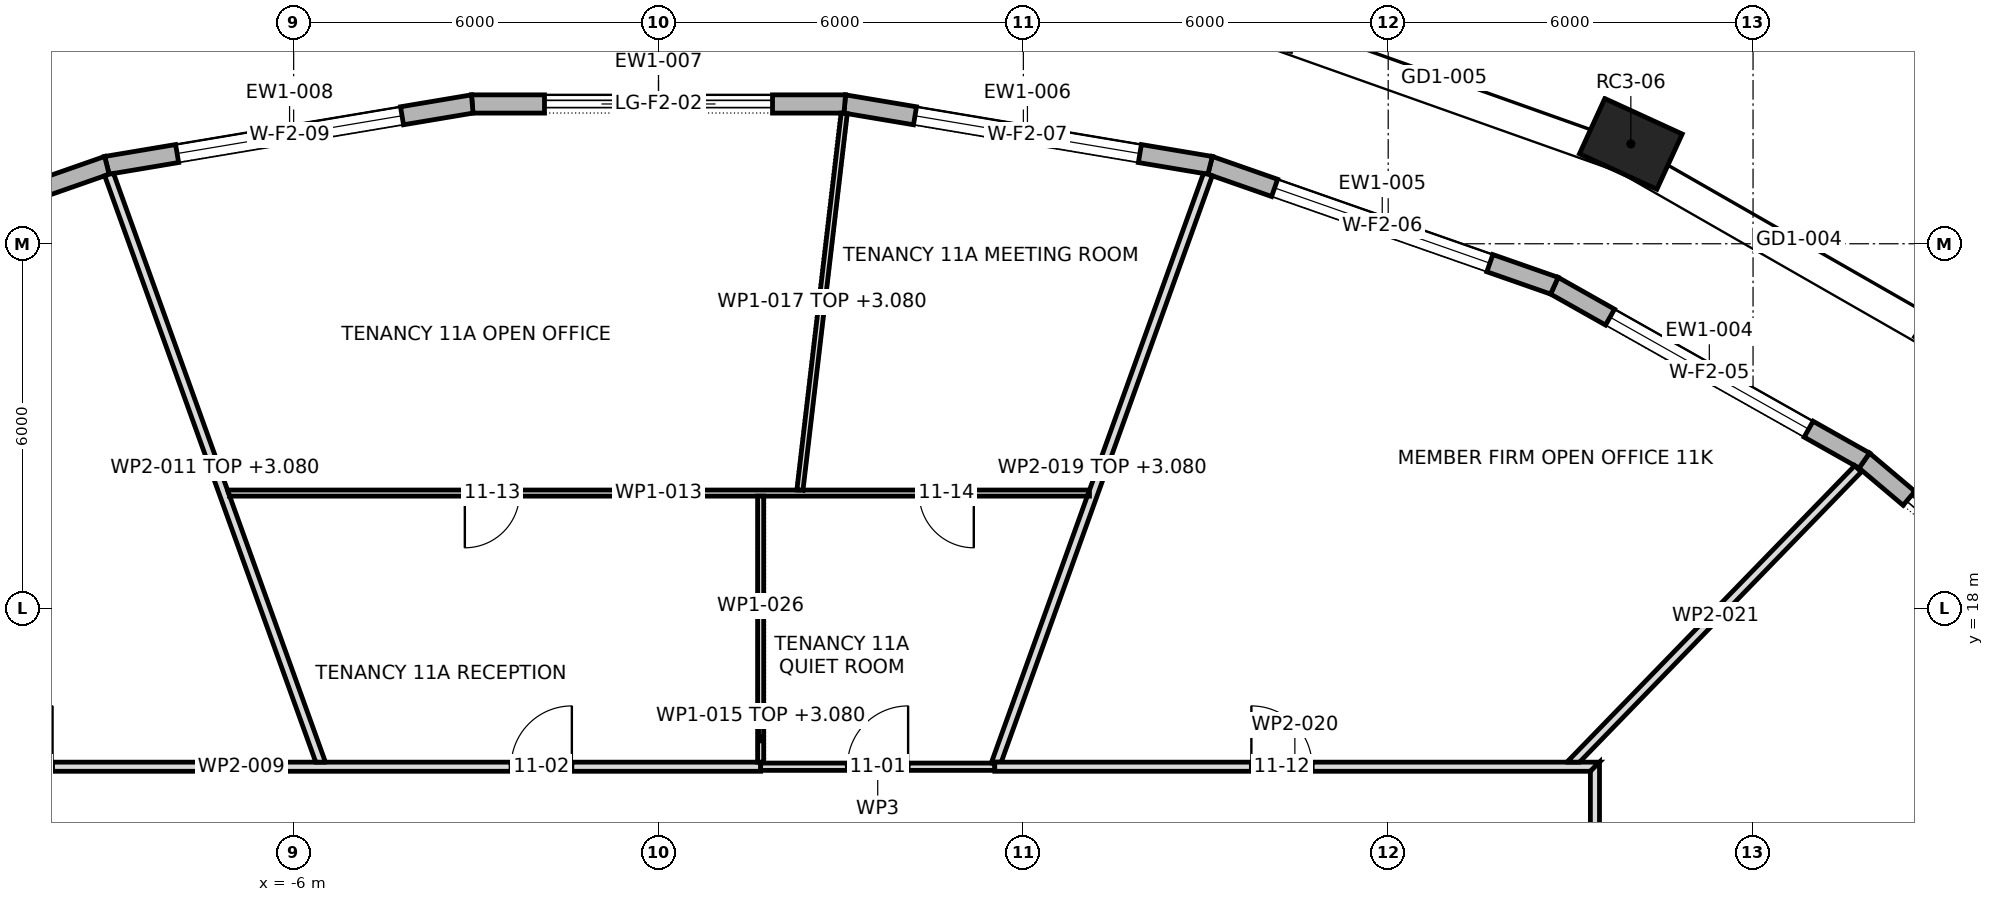
"""IFC4 building model, lengths in metres.
Left out: names, types, materials, properties, quantities, classifications, styles, units other than length and angle.
Written with IfcOpenShell. Run it as: python <this file> out.ifc"""

import sys

from ifc_helpers import new_model, si_unit, direction, frame, frame_2d, origin, origin_2d, place, context, subcontext, project, spatial, polyline, rectangle, outline, extrude, element, fill, save


model = new_model("IFC4")
c1 = context("Model", 3, precision=1e-05, world=origin(), true_north=direction((0.0, 1.0)))
c2 = subcontext(c1, "Body", "Model", "MODEL_VIEW")
j1 = project(units=[si_unit("LENGTHUNIT", "METRE"), si_unit("PLANEANGLEUNIT", "RADIAN")], contexts=[c1])
p1 = place(None, origin())
s1 = spatial("IfcSite", under=j1, at=p1, CompositionType="ELEMENT")
p2 = place(p1, origin())
s2 = spatial("IfcBuilding", under=s1, at=p2, CompositionType="ELEMENT")
p3 = place(p2, frame((0.0, 0.0, 163.3)))
s3 = spatial("IfcBuildingStorey", under=s2, at=p3, CompositionType="ELEMENT", Elevation=163.3)
for number, where, z_axis, x_axis in (
    (1, (21.519, 22.475, 0.0), (0.0, 0.0, 1.0), (-0.818, 0.575, 0.0)),
    (2, (15.99, 25.642, 0.0), (0.0, 0.0, 1.0), (-0.909, 0.417, 0.0)),
):
    element("IfcColumn", number, at=place(p3, frame(where, z_axis=z_axis, x_axis=x_axis)), inside=s3, PredefinedType="COLUMN", context=c2, shape_type="SweptSolid", body=[
        extrude(rectangle(XDim=1.4, YDim=1.0, at=origin_2d()), origin(), (0.0, 0.0, 1.0), 4.2),
    ])
p4 = place(p3, frame((24.165, 16.774, 0.0), z_axis=(0.0, 0.0, 1.0), x_axis=(-0.764076096085, 0.645126126732, 0.0)))
e3 = element("IfcWall", 3, at=p4, inside=s3, PredefinedType="STANDARD", context=c2, shape_type="SweptSolid", body=[
    extrude(outline(polyline([(-0.015, -0.15), (5.689, -0.15), (5.661, 0.15), (0.015, 0.15), (-0.015, -0.15)])), origin(), (0.0, 0.0, 1.0), 3.85),
])
p5 = place(p4, frame((0.962, 0.0, 0.0)))
e4 = element("IfcOpeningElement", 4, at=p5, cuts=e3, PredefinedType="OPENING", context=c2, shape_type="SweptSolid", body=[
    extrude(rectangle(XDim=3.75, YDim=3.45, at=frame_2d((1.875, 1.725))), frame((0.0, 0.162, 0.0), z_axis=(0.0, -1.0, 0.0), x_axis=(1.0, 0.0, 0.0)), (0.0, 0.0, 1.0), 0.324),
])
p6 = place(p3, frame((19.829, 20.435, 0.0), z_axis=(0.0, 0.0, 1.0), x_axis=(-0.870982130072, 0.491314694565, 0.0)))
e5 = element("IfcWall", 5, at=p6, inside=s3, PredefinedType="STANDARD", context=c2, shape_type="SweptSolid", body=[
    extrude(outline(polyline([(-0.014, -0.15), (5.865, -0.15), (5.838, 0.15), (0.014, 0.15), (-0.014, -0.15)])), origin(), (0.0, 0.0, 1.0), 3.85),
])
p7 = place(p6, frame((1.051, 0.0, 0.6)))
e6 = element("IfcOpeningElement", 6, at=p7, cuts=e5, PredefinedType="OPENING", context=c2, shape_type="SweptSolid", body=[
    extrude(rectangle(XDim=3.75, YDim=2.85, at=frame_2d((1.875, 1.425))), frame((0.0, 0.162, 0.0), z_axis=(0.0, -1.0, 0.0), x_axis=(1.0, 0.0, 0.0)), (0.0, 0.0, 1.0), 0.324),
])
p8 = place(p3, frame((14.732, 23.31, 0.0), z_axis=(0.0, 0.0, 1.0), x_axis=(-0.943944636678, 0.330103806228, 0.0)))
e7 = element("IfcWall", 7, at=p8, inside=s3, PredefinedType="STANDARD", context=c2, shape_type="SweptSolid", body=[
    extrude(outline(polyline([(-0.013, -0.15), (6.01, -0.15), (5.985, 0.15), (0.013, 0.15), (-0.013, -0.15)])), origin(), (0.0, 0.0, 1.0), 3.85),
])
p9 = place(p8, frame((1.124, 0.0, 0.6)))
e8 = element("IfcOpeningElement", 8, at=p9, cuts=e7, PredefinedType="OPENING", context=c2, shape_type="SweptSolid", body=[
    extrude(rectangle(XDim=3.75, YDim=2.85, at=frame_2d((1.875, 1.425))), frame((0.0, 0.162, 0.0), z_axis=(0.0, -1.0, 0.0), x_axis=(1.0, 0.0, 0.0)), (0.0, 0.0, 1.0), 0.324),
])
p10 = place(p3, frame((9.071, 25.29, 0.0), z_axis=(0.0, 0.0, 1.0), x_axis=(-0.98618955457, 0.165620537547, 0.0)))
e9 = element("IfcWall", 9, at=p10, inside=s3, PredefinedType="STANDARD", context=c2, shape_type="SweptSolid", body=[
    extrude(outline(polyline([(-0.013, -0.15), (6.105, -0.15), (6.08, 0.15), (0.013, 0.15), (-0.013, -0.15)])), origin(), (0.0, 0.0, 1.0), 3.85),
])
p11 = place(p10, frame((1.171, 0.0, 0.6)))
e10 = element("IfcOpeningElement", 10, at=p11, cuts=e9, PredefinedType="OPENING", context=c2, shape_type="SweptSolid", body=[
    extrude(rectangle(XDim=3.75, YDim=2.85, at=frame_2d((1.875, 1.425))), frame((0.0, 0.162, 0.0), z_axis=(0.0, -1.0, 0.0), x_axis=(1.0, 0.0, 0.0)), (0.0, 0.0, 1.0), 0.324),
])
p12 = place(p3, frame((3.063, 26.299, 0.0), z_axis=(0.0, 0.0, 1.0), x_axis=(-1.0, 0.0, 0.0)))
e11 = element("IfcWall", 11, at=p12, inside=s3, PredefinedType="STANDARD", context=c2, shape_type="SweptSolid", body=[
    extrude(outline(polyline([(-0.012, -0.15), (6.138, -0.15), (6.114, 0.15), (0.012, 0.15), (-0.012, -0.15)])), origin(), (0.0, 0.0, 1.0), 3.85),
])
p13 = place(p12, frame((1.188, 0.0, 0.0)))
e12 = element("IfcOpeningElement", 12, at=p13, cuts=e11, PredefinedType="OPENING", context=c2, shape_type="SweptSolid", body=[
    extrude(rectangle(XDim=3.75, YDim=3.45, at=frame_2d((1.875, 1.725))), frame((0.0, 0.162, 0.0), z_axis=(0.0, -1.0, 0.0), x_axis=(1.0, 0.0, 0.0)), (0.0, 0.0, 1.0), 0.324),
])
p14 = place(p3, frame((-3.063, 26.299, 0.0), z_axis=(0.0, 0.0, 1.0), x_axis=(-0.98618955457, -0.165620537547, 0.0)))
e13 = element("IfcWall", 13, at=p14, inside=s3, PredefinedType="STANDARD", context=c2, shape_type="SweptSolid", body=[
    extrude(outline(polyline([(-0.012, -0.15), (6.105, -0.15), (6.08, 0.15), (0.012, 0.15), (-0.012, -0.15)])), origin(), (0.0, 0.0, 1.0), 3.85),
])
p15 = place(p14, frame((1.171, 0.0, 0.6)))
e14 = element("IfcOpeningElement", 14, at=p15, cuts=e13, PredefinedType="OPENING", context=c2, shape_type="SweptSolid", body=[
    extrude(rectangle(XDim=3.75, YDim=2.85, at=frame_2d((1.875, 1.425))), frame((0.0, 0.162, 0.0), z_axis=(0.0, -1.0, 0.0), x_axis=(1.0, 0.0, 0.0)), (0.0, 0.0, 1.0), 0.324),
])
p16 = place(p3, frame((-9.071, 25.29, 0.0), z_axis=(0.0, 0.0, 1.0), x_axis=(-0.943944636678, -0.330103806228, 0.0)))
e15 = element("IfcWall", 15, at=p16, inside=s3, PredefinedType="STANDARD", context=c2, shape_type="SweptSolid", body=[
    extrude(outline(polyline([(-0.013, -0.15), (6.011, -0.15), (5.984, 0.15), (0.013, 0.15), (-0.013, -0.15)])), origin(), (0.0, 0.0, 1.0), 3.85),
])
p17 = place(p16, frame((1.124, 0.0, 0.6)))
e16 = element("IfcOpeningElement", 16, at=p17, cuts=e15, PredefinedType="OPENING", context=c2, shape_type="SweptSolid", body=[
    extrude(rectangle(XDim=3.75, YDim=2.85, at=frame_2d((1.875, 1.425))), frame((0.0, 0.162, 0.0), z_axis=(0.0, -1.0, 0.0), x_axis=(1.0, 0.0, 0.0)), (0.0, 0.0, 1.0), 0.324),
])
p18 = place(p3, frame((-15.475, 15.4, 0.0), z_axis=(0.0, 0.0, 1.0), x_axis=(1.0, 0.0, 0.0)))
e17 = element("IfcWall", 17, at=p18, inside=s3, PredefinedType="PARTITIONING", context=c2, shape_type="SweptSolid", body=[
    extrude(outline(polyline([(17.155, 0.075), (15.249, 0.075), (13.343, 0.075), (11.437, 0.075), (9.531, 0.075), (7.625, 0.075), (5.719, 0.075), (3.812, 0.075), (1.906, 0.075), (0.0, 0.075), (0.15, -0.075), (2.04, -0.075), (3.929, -0.075), (5.818, -0.075), (7.708, -0.075), (9.597, -0.075), (11.487, -0.075), (13.376, -0.075), (15.266, -0.075), (17.155, -0.075), (17.155, 0.075)])), origin(), (0.0, 0.0, 1.0), 3.85),
])
p19 = place(p18, frame((13.05, 0.0, 0.0)))
e18 = element("IfcOpeningElement", 18, at=p19, cuts=e17, PredefinedType="OPENING", context=c2, shape_type="SweptSolid", body=[
    extrude(rectangle(XDim=1.0, YDim=2.1, at=frame_2d((0.5, 1.05))), frame((0.0, 0.087, 0.0), z_axis=(0.0, -1.0, 0.0), x_axis=(1.0, 0.0, 0.0)), (0.0, 0.0, 1.0), 0.174),
])
p20 = place(p18, frame((4.51, 0.0, 0.0)))
e19 = element("IfcOpeningElement", 19, at=p20, cuts=e17, PredefinedType="OPENING", context=c2, shape_type="SweptSolid", body=[
    extrude(rectangle(XDim=1.0, YDim=2.1, at=frame_2d((0.5, 1.05))), frame((0.0, 0.087, 0.0), z_axis=(0.0, -1.0, 0.0), x_axis=(1.0, 0.0, 0.0)), (0.0, 0.0, 1.0), 0.174),
])
p21 = place(p3, frame((-9.037, 25.143, 0.0), z_axis=(0.0, 0.0, 1.0), x_axis=(0.338668278724, -0.940905838533, 0.0)))
e20 = element("IfcWall", 20, at=p21, inside=s3, PredefinedType="PARTITIONING", context=c2, shape_type="SweptSolid", body=[
    extrude(outline(polyline([(0.0, -0.075), (1.708, -0.075), (3.416, -0.075), (5.124, -0.075), (6.832, -0.075), (8.541, -0.075), (10.249, -0.075), (10.3, 0.069), (10.3, 0.069), (10.302, 0.074), (10.302, 0.075), (8.752, 0.075), (7.203, 0.075), (5.653, 0.075), (5.653, 0.074), (5.651, 0.075), (3.772, 0.075), (1.893, 0.075), (0.014, 0.075), (0.0, 0.003), (0.0, -0.054), (0.0, -0.075)])), origin(), (0.0, 0.0, 1.0), 3.08),
])
p22 = place(p3, frame((-7.087, 19.9, 0.0), z_axis=(0.0, 0.0, 1.0), x_axis=(1.0, 0.0, 0.0)))
e21 = element("IfcWall", 21, at=p22, inside=s3, PredefinedType="PARTITIONING", context=c2, shape_type="SweptSolid", body=[
    extrude(outline(polyline([(0.036, -0.05), (1.772, -0.05), (3.508, -0.05), (5.245, -0.05), (6.981, -0.05), (8.717, -0.05), (8.717, -0.05), (8.817, -0.05), (8.817, -0.05), (10.591, -0.05), (12.365, -0.05), (14.139, -0.05), (14.175, 0.049), (14.175, 0.05), (12.604, 0.05), (11.034, 0.05), (9.464, 0.05), (9.464, 0.049), (9.454, 0.05), (7.563, 0.05), (5.672, 0.05), (3.781, 0.05), (1.891, 0.05), (0.0, 0.05), (0.0, 0.049), (0.036, -0.05)])), origin(), (0.0, 0.0, 1.0), 3.85),
])
p23 = place(p22, frame((3.903, 0.0, 0.0)))
e22 = element("IfcOpeningElement", 22, at=p23, cuts=e21, PredefinedType="OPENING", context=c2, shape_type="SweptSolid", body=[
    extrude(rectangle(XDim=0.9, YDim=2.1, at=frame_2d((0.45, 1.05))), frame((0.0, 0.062, 0.0), z_axis=(0.0, -1.0, 0.0), x_axis=(1.0, 0.0, 0.0)), (0.0, 0.0, 1.0), 0.124),
])
p24 = place(p22, frame((11.373, 0.0, 0.0)))
e23 = element("IfcOpeningElement", 23, at=p24, cuts=e21, PredefinedType="OPENING", context=c2, shape_type="SweptSolid", body=[
    extrude(rectangle(XDim=0.9, YDim=2.1, at=frame_2d((0.45, 1.05))), frame((0.0, 0.062, 0.0), z_axis=(0.0, -1.0, 0.0), x_axis=(1.0, 0.0, 0.0)), (0.0, 0.0, 1.0), 0.124),
])
p25 = place(p3, frame((1.68, 15.46, 0.0), z_axis=(0.0, 0.0, 1.0), x_axis=(0.0, 1.0, 0.0)))
e24 = element("IfcWall", 24, at=p25, inside=s3, PredefinedType="PARTITIONING", context=c2, shape_type="SweptSolid", body=[
    extrude(outline(polyline([(0.79, 0.05), (0.015, 0.05), (0.015, 0.0), (0.0, 0.0), (0.0, -0.05), (0.79, -0.05), (0.79, 0.05)])), origin(), (0.0, 0.0, 1.0), 3.08),
])
p26 = place(p3, frame((1.68, 15.4, 0.0), z_axis=(0.0, 0.0, 1.0), x_axis=(1.0, 0.0, 0.0)))
e25 = element("IfcWall", 25, at=p26, inside=s3, PredefinedType="PARTITIONING", context=c2, shape_type="SweptSolid", body=[
    extrude(rectangle(XDim=3.85, YDim=0.12, at=frame_2d((1.925, 0.0))), origin(), (0.0, 0.0, 1.0), 3.85),
])
p27 = place(p26, frame((1.425, 0.0, 0.0)))
e26 = element("IfcOpeningElement", 26, at=p27, cuts=e25, PredefinedType="OPENING", context=c2, shape_type="SweptSolid", body=[
    extrude(rectangle(XDim=1.0, YDim=2.1, at=frame_2d((0.5, 1.05))), frame((0.0, 0.072, 0.0), z_axis=(0.0, -1.0, 0.0), x_axis=(1.0, 0.0, 0.0)), (0.0, 0.0, 1.0), 0.144),
])
p28 = place(p3, frame((2.325, 19.944, 0.0), z_axis=(0.0, 0.0, 1.0), x_axis=(0.116750504681, 0.993161275754, 0.0)))
e27 = element("IfcWall", 27, at=p28, inside=s3, PredefinedType="PARTITIONING", context=c2, shape_type="SweptSolid", body=[
    extrude(outline(polyline([(6.244, -0.05), (6.244, 0.027), (6.241, 0.05), (4.681, 0.05), (3.121, 0.05), (1.56, 0.05), (0.0, 0.05), (0.012, -0.05), (1.57, -0.05), (3.128, -0.05), (4.686, -0.05), (6.244, -0.05)])), origin(), (0.0, 0.0, 1.0), 3.08),
])
p29 = place(p3, frame((5.542, 15.435, 0.0), z_axis=(0.0, 0.0, 1.0), x_axis=(0.338661655399, 0.940908222497, 0.0)))
e28 = element("IfcWall", 28, at=p29, inside=s3, PredefinedType="PARTITIONING", context=c2, shape_type="SweptSolid", body=[
    extrude(outline(polyline([(10.318, -0.075), (10.318, -0.043), (10.318, 0.003), (10.305, 0.075), (8.46, 0.075), (6.615, 0.075), (4.77, 0.075), (4.677, 0.042), (4.666, 0.075), (3.11, 0.075), (1.555, 0.075), (0.0, 0.075), (0.0, 0.074), (0.02, 0.02), (0.034, 0.025), (0.07, -0.075), (1.778, -0.075), (3.486, -0.075), (5.194, -0.075), (6.902, -0.075), (8.61, -0.075), (10.318, -0.075)])), origin(), (0.0, 0.0, 1.0), 3.08),
])
p30 = place(p3, frame((5.53, 15.4, 0.0), z_axis=(0.0, 0.0, 1.0), x_axis=(1.0, 0.0, 0.0)))
e29 = element("IfcWall", 29, at=p30, inside=s3, PredefinedType="PARTITIONING", context=c2, shape_type="SweptSolid", body=[
    extrude(outline(polyline([(0.0, -0.075), (1.959, -0.075), (3.918, -0.075), (5.877, -0.075), (7.836, -0.075), (9.795, -0.075), (9.945, 0.075), (7.956, 0.075), (5.967, 0.075), (3.978, 0.075), (1.989, 0.075), (0.0, 0.075), (0.0, -0.075)])), origin(), (0.0, 0.0, 1.0), 3.85),
])
p31 = place(p30, frame((4.22, 0.0, 0.0)))
e30 = element("IfcOpeningElement", 30, at=p31, cuts=e29, PredefinedType="OPENING", context=c2, shape_type="SweptSolid", body=[
    extrude(rectangle(XDim=1.0, YDim=2.1, at=frame_2d((0.5, 1.05))), frame((0.0, 0.087, 0.0), z_axis=(0.0, -1.0, 0.0), x_axis=(1.0, 0.0, 0.0)), (0.0, 0.0, 1.0), 0.174),
])
p32 = place(p3, frame((14.992, 15.423, 0.0), z_axis=(0.0, 0.0, 1.0), x_axis=(0.696574400919, 0.71748456707, 0.0)))
e31 = element("IfcWall", 31, at=p32, inside=s3, PredefinedType="PARTITIONING", context=c2, shape_type="SweptSolid", body=[
    extrude(outline(polyline([(0.0, 0.075), (0.0, 0.074), (0.145, -0.075), (1.808, -0.075), (3.47, -0.075), (5.133, -0.075), (6.795, -0.075), (6.795, 0.075), (5.096, 0.075), (3.397, 0.075), (1.699, 0.075), (0.0, 0.075)])), origin(), (0.0, 0.0, 1.0), 3.85),
])
p33 = place(p3, frame((15.4, -15.475, 0.0), z_axis=(0.0, 0.0, 1.0), x_axis=(0.0, 1.0, 0.0)))
e32 = element("IfcWall", 32, at=p33, inside=s3, PredefinedType="PARTITIONING", context=c2, shape_type="SweptSolid", body=[
    extrude(outline(polyline([(0.0, -0.075), (1.935, -0.075), (3.869, -0.075), (5.803, -0.075), (7.738, -0.075), (9.672, -0.075), (11.606, -0.075), (13.541, -0.075), (15.475, -0.075), (17.409, -0.075), (19.344, -0.075), (21.278, -0.075), (23.212, -0.075), (25.147, -0.075), (27.081, -0.075), (29.016, -0.075), (30.95, -0.075), (30.8, 0.075), (28.885, 0.075), (26.969, 0.075), (25.053, 0.075), (23.138, 0.075), (21.222, 0.075), (19.306, 0.075), (17.391, 0.075), (15.475, 0.075), (13.56, 0.075), (11.644, 0.075), (9.728, 0.075), (7.812, 0.075), (5.897, 0.075), (3.981, 0.075), (2.066, 0.075), (0.15, 0.075), (0.0, -0.075)])), origin(), (0.0, 0.0, 1.0), 3.85),
])
p34 = place(p33, frame((9.0, 0.0, 0.0)))
e33 = element("IfcOpeningElement", 33, at=p34, cuts=e32, PredefinedType="OPENING", context=c2, shape_type="SweptSolid", body=[
    extrude(rectangle(XDim=1.0, YDim=2.1, at=frame_2d((0.5, 1.05))), frame((0.0, 0.087, 0.0), z_axis=(0.0, -1.0, 0.0), x_axis=(1.0, 0.0, 0.0)), (0.0, 0.0, 1.0), 0.174),
])
p35 = place(p33, frame((21.635, 0.0, 0.0)))
e34 = element("IfcOpeningElement", 34, at=p35, cuts=e32, PredefinedType="OPENING", context=c2, shape_type="SweptSolid", body=[
    extrude(rectangle(XDim=1.8, YDim=2.1, at=frame_2d((0.9, 1.05))), frame((0.0, 0.087, 0.0), z_axis=(0.0, -1.0, 0.0), x_axis=(1.0, 0.0, 0.0)), (0.0, 0.0, 1.0), 0.174),
])
p36 = place(p3, frame((1.68, 16.25, 0.0), z_axis=(0.0, 0.0, 1.0), x_axis=(0.0, 1.0, 0.0)))
e35 = element("IfcWall", 35, at=p36, inside=s3, PredefinedType="PARTITIONING", context=c2, shape_type="SweptSolid", body=[
    extrude(outline(polyline([(0.0, -0.05), (1.8, -0.05), (3.6, -0.05), (3.6, 0.05), (1.8, 0.05), (0.0, 0.05), (0.0, -0.05)])), origin(), (0.0, 0.0, 1.0), 3.85),
])
p37 = place(p5, origin())
e36 = element("IfcDoor", 36, at=p37, inside=s3, OperationType="DOUBLE_DOOR_SLIDING", PredefinedType="DOOR", context=c2, shape_type="SweptSolid", body=[
    extrude(rectangle(XDim=3.75, YDim=3.45, at=frame_2d((1.875, 1.725))), frame((0.0, 0.025, 0.0), z_axis=(0.0, -1.0, 0.0), x_axis=(1.0, 0.0, 0.0)), (0.0, 0.0, 1.0), 0.05),
])
fill(e4, e36)
p38 = place(p7, origin())
e37 = element("IfcWindow", 37, at=p38, inside=s3, PartitioningType="TRIPLE_PANEL_VERTICAL", PredefinedType="WINDOW", context=c2, shape_type="SweptSolid", body=[
    extrude(rectangle(XDim=3.75, YDim=2.85, at=frame_2d((1.875, 1.425))), frame((0.0, 0.03, 0.0), z_axis=(0.0, -1.0, 0.0), x_axis=(1.0, 0.0, 0.0)), (0.0, 0.0, 1.0), 0.06),
])
fill(e6, e37)
p39 = place(p9, origin())
e38 = element("IfcWindow", 38, at=p39, inside=s3, PartitioningType="TRIPLE_PANEL_VERTICAL", PredefinedType="WINDOW", context=c2, shape_type="SweptSolid", body=[
    extrude(rectangle(XDim=3.75, YDim=2.85, at=frame_2d((1.875, 1.425))), frame((0.0, 0.03, 0.0), z_axis=(0.0, -1.0, 0.0), x_axis=(1.0, 0.0, 0.0)), (0.0, 0.0, 1.0), 0.06),
])
fill(e8, e38)
p40 = place(p11, origin())
e39 = element("IfcWindow", 39, at=p40, inside=s3, PartitioningType="TRIPLE_PANEL_VERTICAL", PredefinedType="WINDOW", context=c2, shape_type="SweptSolid", body=[
    extrude(rectangle(XDim=3.75, YDim=2.85, at=frame_2d((1.875, 1.425))), frame((0.0, 0.03, 0.0), z_axis=(0.0, -1.0, 0.0), x_axis=(1.0, 0.0, 0.0)), (0.0, 0.0, 1.0), 0.06),
])
fill(e10, e39)
p41 = place(p13, origin())
e40 = element("IfcDoor", 40, at=p41, inside=s3, OperationType="DOUBLE_DOOR_SLIDING", PredefinedType="DOOR", context=c2, shape_type="SweptSolid", body=[
    extrude(rectangle(XDim=3.75, YDim=3.45, at=frame_2d((1.875, 1.725))), frame((0.0, 0.025, 0.0), z_axis=(0.0, -1.0, 0.0), x_axis=(1.0, 0.0, 0.0)), (0.0, 0.0, 1.0), 0.05),
])
fill(e12, e40)
p42 = place(p15, origin())
e41 = element("IfcWindow", 41, at=p42, inside=s3, PartitioningType="TRIPLE_PANEL_VERTICAL", PredefinedType="WINDOW", context=c2, shape_type="SweptSolid", body=[
    extrude(rectangle(XDim=3.75, YDim=2.85, at=frame_2d((1.875, 1.425))), frame((0.0, 0.03, 0.0), z_axis=(0.0, -1.0, 0.0), x_axis=(1.0, 0.0, 0.0)), (0.0, 0.0, 1.0), 0.06),
])
fill(e14, e41)
p43 = place(p27, origin())
e42 = element("IfcDoor", 42, at=p43, inside=s3, OperationType="SINGLE_SWING_LEFT", PredefinedType="DOOR", context=c2, shape_type="SweptSolid", body=[
    extrude(rectangle(XDim=1.0, YDim=2.1, at=frame_2d((0.5, 1.05))), frame((0.0, 0.025, 0.0), z_axis=(0.0, -1.0, 0.0), x_axis=(1.0, 0.0, 0.0)), (0.0, 0.0, 1.0), 0.05),
])
fill(e26, e42)
p44 = place(p19, origin())
e43 = element("IfcDoor", 43, at=p44, inside=s3, OperationType="SINGLE_SWING_LEFT", PredefinedType="DOOR", context=c2, shape_type="SweptSolid", body=[
    extrude(rectangle(XDim=1.0, YDim=2.1, at=frame_2d((0.5, 1.05))), frame((0.0, 0.025, 0.0), z_axis=(0.0, -1.0, 0.0), x_axis=(1.0, 0.0, 0.0)), (0.0, 0.0, 1.0), 0.05),
])
fill(e18, e43)
p45 = place(p31, origin())
e44 = element("IfcDoor", 44, at=p45, inside=s3, OperationType="SINGLE_SWING_RIGHT", PredefinedType="DOOR", context=c2, shape_type="SweptSolid", body=[
    extrude(rectangle(XDim=1.0, YDim=2.1, at=frame_2d((0.5, 1.05))), frame((0.0, 0.025, 0.0), z_axis=(0.0, -1.0, 0.0), x_axis=(1.0, 0.0, 0.0)), (0.0, 0.0, 1.0), 0.05),
])
fill(e30, e44)
p46 = place(p23, frame((0.9, 0.0, 0.0), z_axis=(0.0, 0.0, 1.0), x_axis=(-1.0, 0.0, 0.0)))
e45 = element("IfcDoor", 45, at=p46, inside=s3, OperationType="SINGLE_SWING_LEFT", PredefinedType="DOOR", context=c2, shape_type="SweptSolid", body=[
    extrude(rectangle(XDim=0.9, YDim=2.1, at=frame_2d((0.45, 1.05))), frame((0.0, 0.025, 0.0), z_axis=(0.0, -1.0, 0.0), x_axis=(1.0, 0.0, 0.0)), (0.0, 0.0, 1.0), 0.05),
])
fill(e22, e45)
p47 = place(p24, frame((0.9, 0.0, 0.0), z_axis=(0.0, 0.0, 1.0), x_axis=(-1.0, 0.0, 0.0)))
e46 = element("IfcDoor", 46, at=p47, inside=s3, OperationType="SINGLE_SWING_RIGHT", PredefinedType="DOOR", context=c2, shape_type="SweptSolid", body=[
    extrude(rectangle(XDim=0.9, YDim=2.1, at=frame_2d((0.45, 1.05))), frame((0.0, 0.025, 0.0), z_axis=(0.0, -1.0, 0.0), x_axis=(1.0, 0.0, 0.0)), (0.0, 0.0, 1.0), 0.05),
])
fill(e23, e46)
save(model, sys.argv[1])
